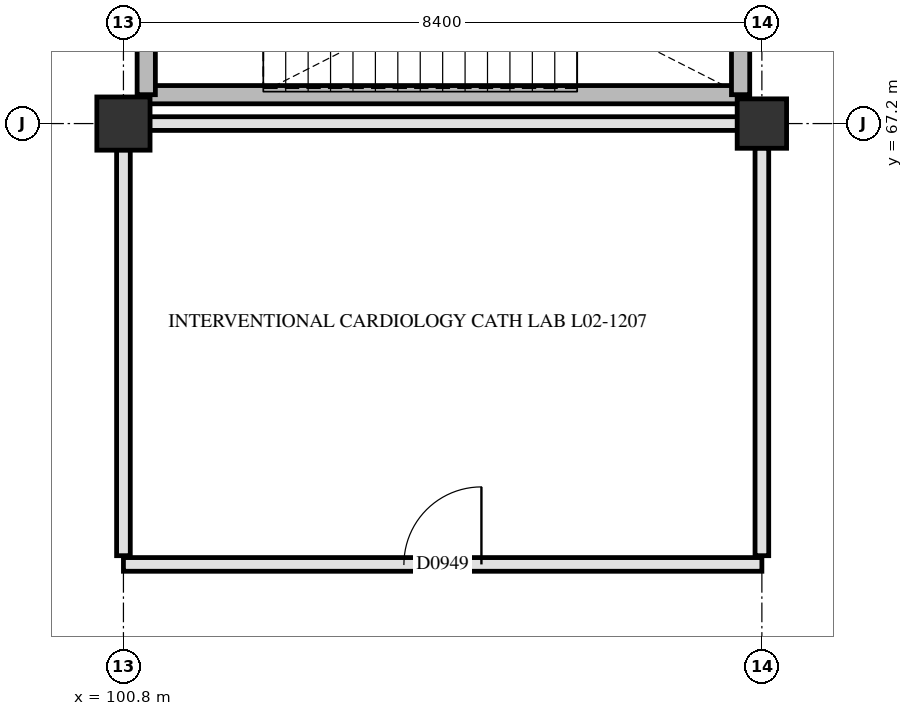
"""IFC4 building model, lengths in metres.
Left out: names, types, materials, properties, quantities, classifications, styles, units other than length and angle.
Written with IfcOpenShell. Run it as: python <this file> out.ifc"""

import sys

from ifc_helpers import new_model, si_unit, direction, frame, frame_2d, origin, origin_2d, place, context, subcontext, project, spatial, rectangle, circle, extrude, element, fill, save


model = new_model("IFC4")
c1 = context("Model", 3, precision=1e-05, world=origin(), true_north=direction((0.0, 1.0)))
c2 = subcontext(c1, "Body", "Model", "MODEL_VIEW")
j1 = project(units=[si_unit("LENGTHUNIT", "METRE"), si_unit("PLANEANGLEUNIT", "RADIAN")], contexts=[c1])
p1 = place(None, origin())
s1 = spatial("IfcSite", under=j1, at=p1, CompositionType="ELEMENT")
p2 = place(p1, origin())
s2 = spatial("IfcBuilding", under=s1, at=p2, CompositionType="ELEMENT")
p3 = place(p2, frame((0.0, 0.0, 9.3)))
s3 = spatial("IfcBuildingStorey", under=s2, at=p3, CompositionType="ELEMENT", Elevation=9.3)
p4 = place(p3, frame((100.8, 67.2, 0.0), z_axis=(0.0, 0.0, 1.0), x_axis=(1.0, 0.0, 0.0)))
e1 = element("IfcColumn", 1, at=p4, inside=s3, PredefinedType="COLUMN", context=c2, shape_type="SweptSolid", body=[
    extrude(rectangle(XDim=0.7, YDim=0.7, at=origin_2d()), origin(), (0.0, 0.0, 1.0), 5.1),
])
p5 = place(p3, frame((109.2, 67.2, 0.0), z_axis=(0.0, 0.0, 1.0), x_axis=(1.0, 0.0, 0.0)))
e2 = element("IfcColumn", 2, at=p5, inside=s3, PredefinedType="COLUMN", context=c2, shape_type="SweptSolid", body=[
    extrude(circle(Radius=0.325, at=origin_2d()), origin(), (0.0, 0.0, 1.0), 5.1),
])
p6 = place(p3, frame((101.1, 67.58, 0.0), z_axis=(0.0, 0.0, 1.0), x_axis=(1.0, 0.0, 0.0)))
e3 = element("IfcWall", 3, at=p6, inside=s3, PredefinedType="SHEAR", context=c2, shape_type="SweptSolid", body=[
    extrude(rectangle(XDim=7.82, YDim=0.24, at=frame_2d((3.91, 0.0))), origin(), (0.0, 0.0, 1.0), 4.78),
])
for number, where, z_axis, x_axis in (
    (4, (101.1, 67.58, 0.0), (0.0, 0.0, 1.0), (0.0, 1.0, 0.0)),
    (5, (108.92, 67.58, 0.0), (0.0, 0.0, 1.0), (0.0, 1.0, 0.0)),
):
    element("IfcWall", number, at=place(p3, frame(where, z_axis=z_axis, x_axis=x_axis)), inside=s3, PredefinedType="SHEAR", context=c2, shape_type="SweptSolid", body=[
        extrude(rectangle(XDim=3.32, YDim=0.24, at=frame_2d((1.66, 0.0))), origin(), (0.0, 0.0, 1.0), 4.78),
    ])
p7 = place(p3, frame((100.8, 61.4, 0.0), z_axis=(0.0, 0.0, 1.0), x_axis=(1.0, 0.0, 0.0)))
e6 = element("IfcWall", 6, at=p7, inside=s3, PredefinedType="PARTITIONING", context=c2, shape_type="SweptSolid", body=[
    extrude(rectangle(XDim=8.4, YDim=0.18, at=frame_2d((4.2, 0.0))), origin(), (0.0, 0.0, 1.0), 4.17),
])
p8 = place(p7, frame((3.69, 0.0, 0.0)))
e7 = element("IfcOpeningElement", 7, at=p8, cuts=e6, PredefinedType="OPENING", context=c2, shape_type="SweptSolid", body=[
    extrude(rectangle(XDim=1.02, YDim=2.12, at=frame_2d((0.51, 1.06))), frame((0.0, 0.1, 0.0), z_axis=(0.0, -1.0, 0.0), x_axis=(1.0, 0.0, 0.0)), (0.0, 0.0, 1.0), 0.2),
])
p9 = place(p3, frame((101.145, 67.2, 0.0), z_axis=(0.0, 0.0, 1.0), x_axis=(1.0, 0.0, 0.0)))
e8 = element("IfcWall", 8, at=p9, inside=s3, PredefinedType="PARTITIONING", context=c2, shape_type="SweptSolid", body=[
    extrude(rectangle(XDim=7.735, YDim=0.18, at=frame_2d((3.867, 0.0))), origin(), (0.0, 0.0, 1.0), 4.17),
])
p10 = place(p3, frame((100.8, 61.515, 0.0), z_axis=(0.0, 0.0, 1.0), x_axis=(0.0, 1.0, 0.0)))
e9 = element("IfcWall", 9, at=p10, inside=s3, PredefinedType="PARTITIONING", context=c2, shape_type="SweptSolid", body=[
    extrude(rectangle(XDim=5.34, YDim=0.18, at=frame_2d((2.67, 0.0))), origin(), (0.0, 0.0, 1.0), 4.17),
])
p11 = place(p3, frame((109.2, 61.515, 0.0), z_axis=(0.0, 0.0, 1.0), x_axis=(0.0, 1.0, 0.0)))
e10 = element("IfcWall", 10, at=p11, inside=s3, PredefinedType="PARTITIONING", context=c2, shape_type="SweptSolid", body=[
    extrude(rectangle(XDim=5.365, YDim=0.18, at=frame_2d((2.683, 0.0))), origin(), (0.0, 0.0, 1.0), 4.17),
])
p12 = place(p8, origin())
e11 = element("IfcDoor", 11, at=p12, inside=s3, OperationType="SINGLE_SWING_RIGHT", PredefinedType="DOOR", context=c2, shape_type="SweptSolid", body=[
    extrude(rectangle(XDim=1.02, YDim=2.12, at=frame_2d((0.51, 1.06))), frame((0.0, 0.025, 0.0), z_axis=(0.0, -1.0, 0.0), x_axis=(1.0, 0.0, 0.0)), (0.0, 0.0, 1.0), 0.05),
])
fill(e7, e11)
save(model, sys.argv[1])
